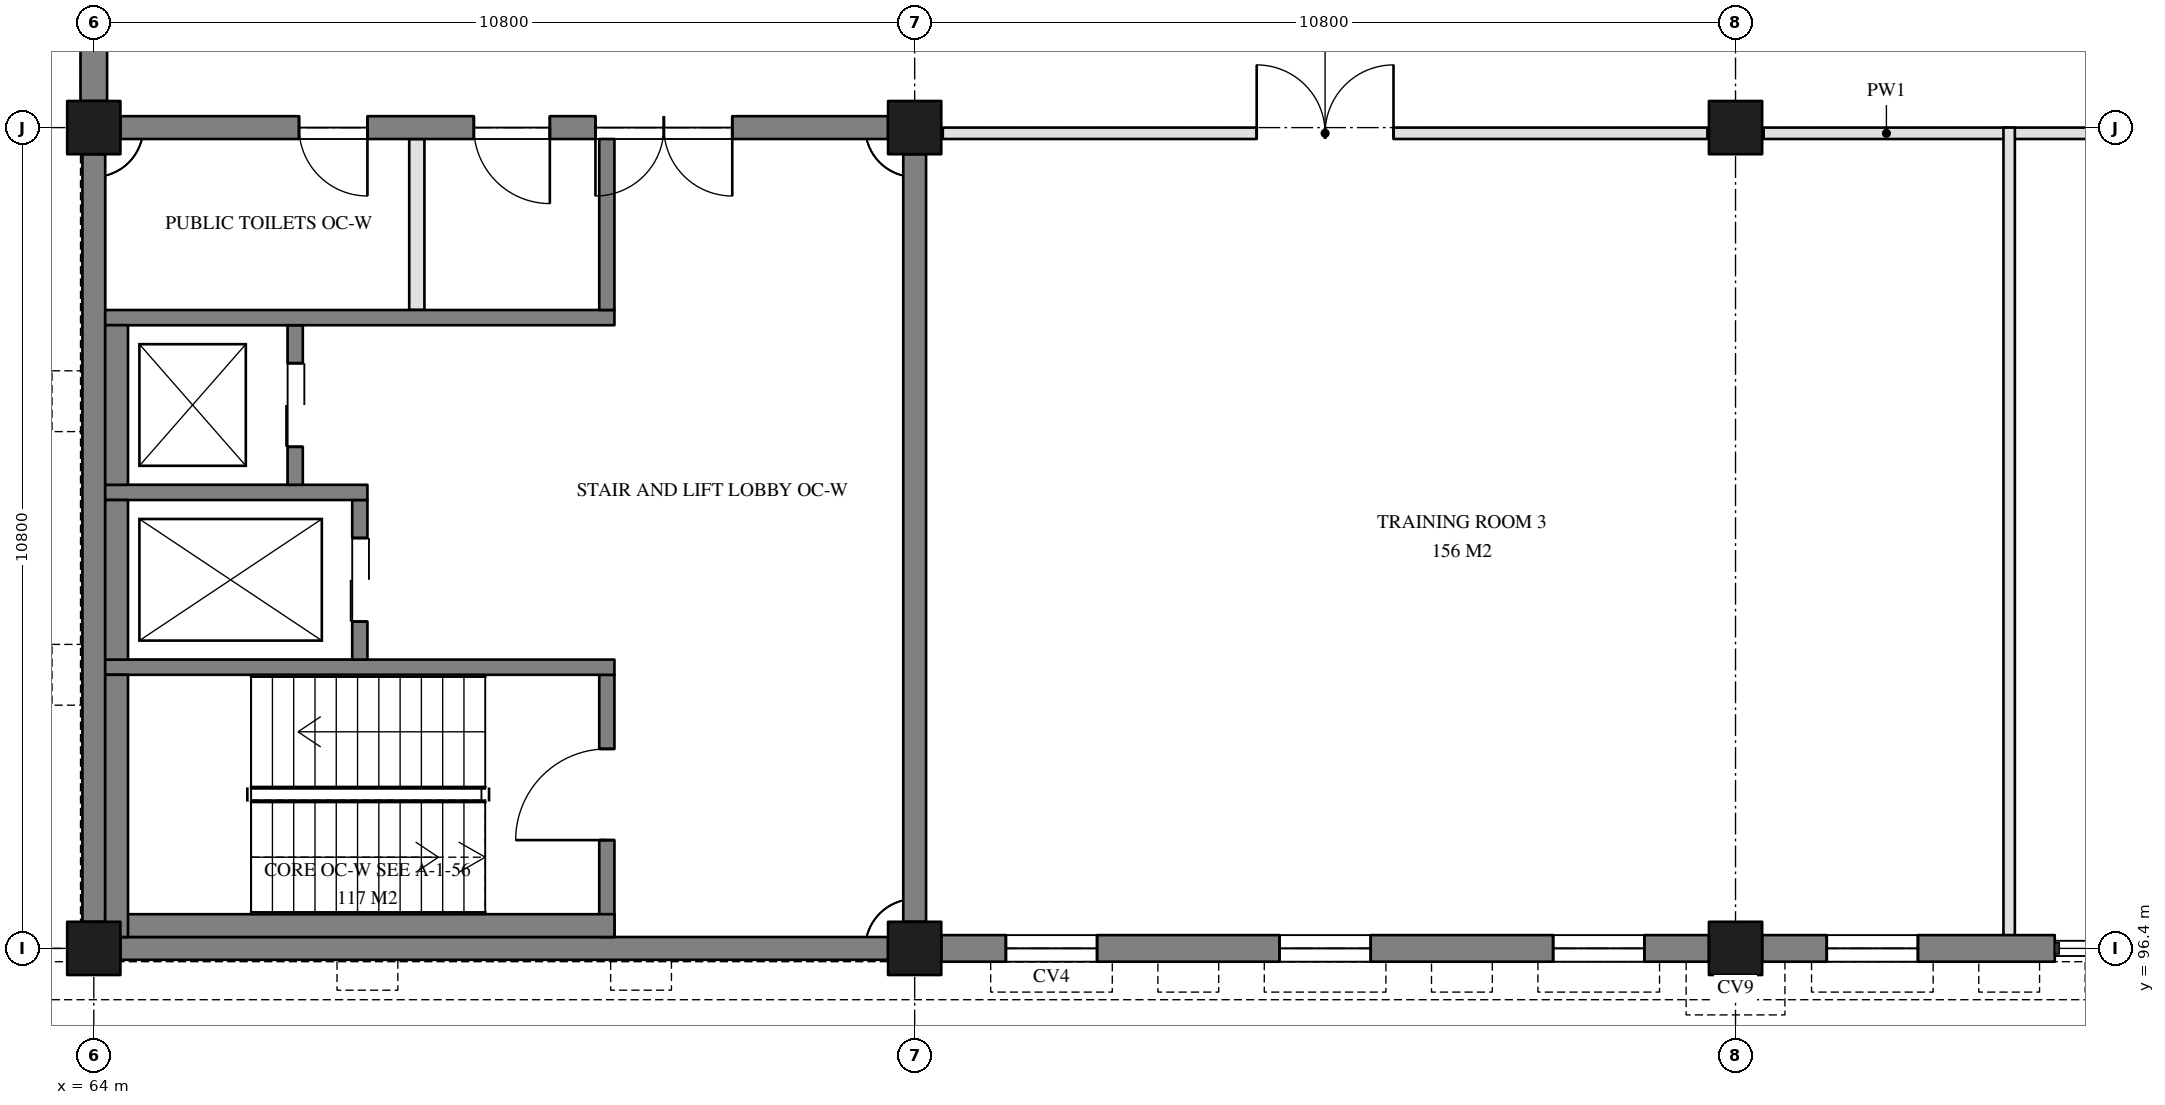
"""IFC4 building model, lengths in metres.
Left out: names, types, materials, properties, quantities, classifications, styles, units other than length and angle.
Written with IfcOpenShell. Run it as: python <this file> out.ifc"""

import sys

from ifc_helpers import new_model, si_unit, direction, frame, frame_2d, origin, origin_2d, place, context, subcontext, project, spatial, rectangle, extrude, element, fill, save


model = new_model("IFC4")
c1 = context("Model", 3, precision=1e-05, world=origin(), true_north=direction((0.0, 1.0)))
c2 = subcontext(c1, "Body", "Model", "MODEL_VIEW")
j1 = project(units=[si_unit("LENGTHUNIT", "METRE"), si_unit("PLANEANGLEUNIT", "RADIAN")], contexts=[c1])
p1 = place(None, origin())
s1 = spatial("IfcSite", under=j1, at=p1, CompositionType="ELEMENT")
p2 = place(p1, origin())
s2 = spatial("IfcBuilding", under=s1, at=p2, CompositionType="ELEMENT")
p3 = place(p2, frame((0.0, 0.0, 20.4)))
s3 = spatial("IfcBuildingStorey", under=s2, at=p3, CompositionType="ELEMENT", Elevation=20.4)
for number, where, z_axis, x_axis in (
    (1, (64.0, 96.4, 0.0), (0.0, 0.0, 1.0), (1.0, 0.0, 0.0)),
    (2, (64.0, 107.2, 0.0), (0.0, 0.0, 1.0), (1.0, 0.0, 0.0)),
    (3, (74.8, 96.4, 0.0), (0.0, 0.0, 1.0), (1.0, 0.0, 0.0)),
    (4, (74.8, 107.2, 0.0), (0.0, 0.0, 1.0), (1.0, 0.0, 0.0)),
    (5, (85.6, 96.4, 0.0), (0.0, 0.0, 1.0), (1.0, 0.0, 0.0)),
    (6, (85.6, 107.2, 0.0), (0.0, 0.0, 1.0), (1.0, 0.0, 0.0)),
):
    element("IfcColumn", number, at=place(p3, frame(where, z_axis=z_axis, x_axis=x_axis)), inside=s3, PredefinedType="COLUMN", context=c2, shape_type="SweptSolid", body=[
        extrude(rectangle(XDim=0.7, YDim=0.7, at=origin_2d()), origin(), (0.0, 0.0, 1.0), 3.9),
    ])
p4 = place(p3, frame((64.35, 96.4, 0.0), z_axis=(0.0, 0.0, 1.0), x_axis=(1.0, 0.0, 0.0)))
e7 = element("IfcWall", 7, at=p4, inside=s3, PredefinedType="SOLIDWALL", context=c2, shape_type="SweptSolid", body=[
    extrude(rectangle(XDim=10.1, YDim=0.3, at=frame_2d((5.05, 0.0))), origin(), (0.0, 0.0, 1.0), 3.9),
])
p5 = place(p3, frame((74.8, 96.75, 0.0), z_axis=(0.0, 0.0, 1.0), x_axis=(0.0, 1.0, 0.0)))
e8 = element("IfcWall", 8, at=p5, inside=s3, PredefinedType="SOLIDWALL", context=c2, shape_type="SweptSolid", body=[
    extrude(rectangle(XDim=10.1, YDim=0.3, at=frame_2d((5.05, 0.0))), origin(), (0.0, 0.0, 1.0), 3.9),
])
p6 = place(p3, frame((74.45, 107.2, 0.0), z_axis=(0.0, 0.0, 1.0), x_axis=(-1.0, 0.0, 0.0)))
e9 = element("IfcWall", 9, at=p6, inside=s3, PredefinedType="SOLIDWALL", context=c2, shape_type="SweptSolid", body=[
    extrude(rectangle(XDim=10.1, YDim=0.3, at=frame_2d((5.05, 0.0))), origin(), (0.0, 0.0, 1.0), 3.9),
])
p7 = place(p6, frame((2.05, 0.0, 0.0)))
e10 = element("IfcOpeningElement", 10, at=p7, cuts=e9, PredefinedType="OPENING", context=c2, shape_type="SweptSolid", body=[
    extrude(rectangle(XDim=1.8, YDim=2.1, at=frame_2d((0.9, 1.05))), frame((0.0, 0.16, 0.0), z_axis=(0.0, -1.0, 0.0), x_axis=(1.0, 0.0, 0.0)), (0.0, 0.0, 1.0), 0.32),
])
p8 = place(p6, frame((4.45, 0.0, 0.0)))
e11 = element("IfcOpeningElement", 11, at=p8, cuts=e9, PredefinedType="OPENING", context=c2, shape_type="SweptSolid", body=[
    extrude(rectangle(XDim=1.0, YDim=2.1, at=frame_2d((0.5, 1.05))), frame((0.0, 0.16, 0.0), z_axis=(0.0, -1.0, 0.0), x_axis=(1.0, 0.0, 0.0)), (0.0, 0.0, 1.0), 0.32),
])
p9 = place(p6, frame((6.85, 0.0, 0.0)))
e12 = element("IfcOpeningElement", 12, at=p9, cuts=e9, PredefinedType="OPENING", context=c2, shape_type="SweptSolid", body=[
    extrude(rectangle(XDim=0.9, YDim=2.1, at=frame_2d((0.45, 1.05))), frame((0.0, 0.16, 0.0), z_axis=(0.0, -1.0, 0.0), x_axis=(1.0, 0.0, 0.0)), (0.0, 0.0, 1.0), 0.32),
])
p10 = place(p3, frame((64.0, 106.85, 0.0), z_axis=(0.0, 0.0, 1.0), x_axis=(0.0, -1.0, 0.0)))
e13 = element("IfcWall", 13, at=p10, inside=s3, PredefinedType="SOLIDWALL", context=c2, shape_type="SweptSolid", body=[
    extrude(rectangle(XDim=10.1, YDim=0.3, at=frame_2d((5.05, 0.0))), origin(), (0.0, 0.0, 1.0), 3.9),
])
p11 = place(p3, frame((75.15, 96.4, 0.0), z_axis=(0.0, 0.0, 1.0), x_axis=(1.0, 0.0, 0.0)))
e14 = element("IfcWall", 14, at=p11, inside=s3, PredefinedType="SOLIDWALL", context=c2, shape_type="SweptSolid", body=[
    extrude(rectangle(XDim=10.1, YDim=0.35, at=frame_2d((5.05, 0.0))), origin(), (0.0, 0.0, 1.0), 2.8),
])
p12 = place(p11, frame((0.85, 0.0, 0.9)))
e15 = element("IfcOpeningElement", 15, at=p12, cuts=e14, PredefinedType="OPENING", context=c2, shape_type="SweptSolid", body=[
    extrude(rectangle(XDim=1.2, YDim=1.8, at=frame_2d((0.6, 0.9))), frame((0.0, 0.185, 0.0), z_axis=(0.0, -1.0, 0.0), x_axis=(1.0, 0.0, 0.0)), (0.0, 0.0, 1.0), 0.37),
])
p13 = place(p11, frame((4.45, 0.0, 0.9)))
e16 = element("IfcOpeningElement", 16, at=p13, cuts=e14, PredefinedType="OPENING", context=c2, shape_type="SweptSolid", body=[
    extrude(rectangle(XDim=1.2, YDim=1.8, at=frame_2d((0.6, 0.9))), frame((0.0, 0.185, 0.0), z_axis=(0.0, -1.0, 0.0), x_axis=(1.0, 0.0, 0.0)), (0.0, 0.0, 1.0), 0.37),
])
p14 = place(p11, frame((8.05, 0.0, 0.9)))
e17 = element("IfcOpeningElement", 17, at=p14, cuts=e14, PredefinedType="OPENING", context=c2, shape_type="SweptSolid", body=[
    extrude(rectangle(XDim=1.2, YDim=1.8, at=frame_2d((0.6, 0.9))), frame((0.0, 0.185, 0.0), z_axis=(0.0, -1.0, 0.0), x_axis=(1.0, 0.0, 0.0)), (0.0, 0.0, 1.0), 0.37),
])
p15 = place(p3, frame((85.95, 96.4, 0.0), z_axis=(0.0, 0.0, 1.0), x_axis=(1.0, 0.0, 0.0)))
e18 = element("IfcWall", 18, at=p15, inside=s3, PredefinedType="SOLIDWALL", context=c2, shape_type="SweptSolid", body=[
    extrude(rectangle(XDim=3.85, YDim=0.35, at=frame_2d((1.925, 0.0))), origin(), (0.0, 0.0, 1.0), 2.8),
])
p16 = place(p15, frame((0.85, 0.0, 0.9)))
e19 = element("IfcOpeningElement", 19, at=p16, cuts=e18, PredefinedType="OPENING", context=c2, shape_type="SweptSolid", body=[
    extrude(rectangle(XDim=1.2, YDim=1.8, at=frame_2d((0.6, 0.9))), frame((0.0, 0.185, 0.0), z_axis=(0.0, -1.0, 0.0), x_axis=(1.0, 0.0, 0.0)), (0.0, 0.0, 1.0), 0.37),
])
p17 = place(p3, frame((64.0, 107.55, 0.0), z_axis=(0.0, 0.0, 1.0), x_axis=(0.0, 1.0, 0.0)))
e20 = element("IfcWall", 20, at=p17, inside=s3, PredefinedType="SOLIDWALL", context=c2, shape_type="SweptSolid", body=[
    extrude(rectangle(XDim=3.85, YDim=0.35, at=frame_2d((1.925, 0.0))), origin(), (0.0, 0.0, 1.0), 2.8),
])
p18 = place(p17, frame((1.0, 0.0, 0.9)))
e21 = element("IfcOpeningElement", 21, at=p18, cuts=e20, PredefinedType="OPENING", context=c2, shape_type="SweptSolid", body=[
    extrude(rectangle(XDim=0.9, YDim=1.8, at=frame_2d((0.45, 0.9))), frame((0.0, 0.185, 0.0), z_axis=(0.0, -1.0, 0.0), x_axis=(1.0, 0.0, 0.0)), (0.0, 0.0, 1.0), 0.37),
])
p19 = place(p3, frame((70.75, 96.55, 0.0), z_axis=(0.0, 0.0, 1.0), x_axis=(0.0, 1.0, 0.0)))
e22 = element("IfcWall", 22, at=p19, inside=s3, PredefinedType="SOLIDWALL", context=c2, shape_type="SweptSolid", body=[
    extrude(rectangle(XDim=3.45, YDim=0.2, at=frame_2d((1.725, 0.0))), origin(), (0.0, 0.0, 1.0), 3.6),
])
p20 = place(p19, frame((1.275, 0.0, 0.0)))
e23 = element("IfcOpeningElement", 23, at=p20, cuts=e22, PredefinedType="OPENING", context=c2, shape_type="SweptSolid", body=[
    extrude(rectangle(XDim=1.2, YDim=2.1, at=frame_2d((0.6, 1.05))), frame((0.0, 0.11, 0.0), z_axis=(0.0, -1.0, 0.0), x_axis=(1.0, 0.0, 0.0)), (0.0, 0.0, 1.0), 0.22),
])
p21 = place(p3, frame((70.85, 100.1, 0.0), z_axis=(0.0, 0.0, 1.0), x_axis=(-1.0, 0.0, 0.0)))
e24 = element("IfcWall", 24, at=p21, inside=s3, PredefinedType="SOLIDWALL", context=c2, shape_type="SweptSolid", body=[
    extrude(rectangle(XDim=6.7, YDim=0.2, at=frame_2d((3.35, 0.0))), origin(), (0.0, 0.0, 1.0), 3.6),
])
p22 = place(p3, frame((67.5, 100.2, 0.0), z_axis=(0.0, 0.0, 1.0), x_axis=(0.0, 1.0, 0.0)))
e25 = element("IfcWall", 25, at=p22, inside=s3, PredefinedType="SOLIDWALL", context=c2, shape_type="SweptSolid", body=[
    extrude(rectangle(XDim=2.1, YDim=0.2, at=frame_2d((1.05, 0.0))), origin(), (0.0, 0.0, 1.0), 3.6),
])
p23 = place(p22, frame((0.5, 0.0, 0.0)))
e26 = element("IfcOpeningElement", 26, at=p23, cuts=e25, PredefinedType="OPENING", context=c2, shape_type="SweptSolid", body=[
    extrude(rectangle(XDim=1.1, YDim=2.1, at=frame_2d((0.55, 1.05))), frame((0.0, 0.11, 0.0), z_axis=(0.0, -1.0, 0.0), x_axis=(1.0, 0.0, 0.0)), (0.0, 0.0, 1.0), 0.22),
])
p24 = place(p3, frame((67.6, 102.4, 0.0), z_axis=(0.0, 0.0, 1.0), x_axis=(-1.0, 0.0, 0.0)))
e27 = element("IfcWall", 27, at=p24, inside=s3, PredefinedType="SOLIDWALL", context=c2, shape_type="SweptSolid", body=[
    extrude(rectangle(XDim=3.45, YDim=0.2, at=frame_2d((1.725, 0.0))), origin(), (0.0, 0.0, 1.0), 3.6),
])
p25 = place(p3, frame((66.65, 102.5, 0.0), z_axis=(0.0, 0.0, 1.0), x_axis=(0.0, 1.0, 0.0)))
e28 = element("IfcWall", 28, at=p25, inside=s3, PredefinedType="SOLIDWALL", context=c2, shape_type="SweptSolid", body=[
    extrude(rectangle(XDim=2.1, YDim=0.2, at=frame_2d((1.05, 0.0))), origin(), (0.0, 0.0, 1.0), 3.6),
])
p26 = place(p25, frame((0.5, 0.0, 0.0)))
e29 = element("IfcOpeningElement", 29, at=p26, cuts=e28, PredefinedType="OPENING", context=c2, shape_type="SweptSolid", body=[
    extrude(rectangle(XDim=1.1, YDim=2.1, at=frame_2d((0.55, 1.05))), frame((0.0, 0.11, 0.0), z_axis=(0.0, -1.0, 0.0), x_axis=(1.0, 0.0, 0.0)), (0.0, 0.0, 1.0), 0.22),
])
p27 = place(p3, frame((70.85, 104.7, 0.0), z_axis=(0.0, 0.0, 1.0), x_axis=(-1.0, 0.0, 0.0)))
e30 = element("IfcWall", 30, at=p27, inside=s3, PredefinedType="SOLIDWALL", context=c2, shape_type="SweptSolid", body=[
    extrude(rectangle(XDim=6.7, YDim=0.2, at=frame_2d((3.35, 0.0))), origin(), (0.0, 0.0, 1.0), 3.6),
])
p28 = place(p3, frame((70.75, 104.8, 0.0), z_axis=(0.0, 0.0, 1.0), x_axis=(0.0, 1.0, 0.0)))
e31 = element("IfcWall", 31, at=p28, inside=s3, PredefinedType="SOLIDWALL", context=c2, shape_type="SweptSolid", body=[
    extrude(rectangle(XDim=2.25, YDim=0.2, at=frame_2d((1.125, 0.0))), origin(), (0.0, 0.0, 1.0), 3.6),
])
p29 = place(p3, frame((70.85, 96.7, -0.3), z_axis=(0.0, 0.0, 1.0), x_axis=(-1.0, 0.0, 0.0)))
e32 = element("IfcWall", 32, at=p29, inside=s3, PredefinedType="SOLIDWALL", context=c2, shape_type="SweptSolid", body=[
    extrude(rectangle(XDim=6.7, YDim=0.3, at=frame_2d((3.35, 0.0))), origin(), (0.0, 0.0, 1.0), 3.9),
])
p30 = place(p3, frame((64.3, 96.55, -0.3), z_axis=(0.0, 0.0, 1.0), x_axis=(0.0, 1.0, 0.0)))
e33 = element("IfcWall", 33, at=p30, inside=s3, PredefinedType="SOLIDWALL", context=c2, shape_type="SweptSolid", body=[
    extrude(rectangle(XDim=3.45, YDim=0.3, at=frame_2d((1.725, 0.0))), origin(), (0.0, 0.0, 1.0), 3.9),
])
for number, where, z_axis, x_axis in (
    (34, (64.3, 100.2, -0.3), (0.0, 0.0, 1.0), (0.0, 1.0, 0.0)),
    (35, (64.3, 102.5, -0.3), (0.0, 0.0, 1.0), (0.0, 1.0, 0.0)),
):
    element("IfcWall", number, at=place(p3, frame(where, z_axis=z_axis, x_axis=x_axis)), inside=s3, PredefinedType="SOLIDWALL", context=c2, shape_type="SweptSolid", body=[
        extrude(rectangle(XDim=2.1, YDim=0.3, at=frame_2d((1.05, 0.0))), origin(), (0.0, 0.0, 1.0), 3.9),
    ])
p31 = place(p3, frame((68.25, 104.8, 0.0), z_axis=(0.0, 0.0, 1.0), x_axis=(0.0, 1.0, 0.0)))
e36 = element("IfcWall", 36, at=p31, inside=s3, PredefinedType="PARTITIONING", context=c2, shape_type="SweptSolid", body=[
    extrude(rectangle(XDim=2.25, YDim=0.2, at=frame_2d((1.125, 0.0))), origin(), (0.0, 0.0, 1.0), 3.6),
])
p32 = place(p3, frame((85.97, 107.125, 0.0), z_axis=(0.0, 0.0, 1.0), x_axis=(1.0, 0.0, 0.0)))
e37 = element("IfcWall", 37, at=p32, inside=s3, PredefinedType="PARTITIONING", context=c2, shape_type="SweptSolid", body=[
    extrude(rectangle(XDim=3.23, YDim=0.15, at=frame_2d((1.615, 0.0))), origin(), (0.0, 0.0, 1.0), 2.8),
])
p33 = place(p3, frame((75.17, 107.125, 0.0), z_axis=(0.0, 0.0, 1.0), x_axis=(1.0, 0.0, 0.0)))
e38 = element("IfcWall", 38, at=p33, inside=s3, PredefinedType="PARTITIONING", context=c2, shape_type="SweptSolid", body=[
    extrude(rectangle(XDim=10.06, YDim=0.15, at=frame_2d((5.03, 0.0))), origin(), (0.0, 0.0, 1.0), 2.8),
])
p34 = place(p33, frame((4.13, 0.0, 0.0)))
e39 = element("IfcOpeningElement", 39, at=p34, cuts=e38, PredefinedType="OPENING", context=c2, shape_type="SweptSolid", body=[
    extrude(rectangle(XDim=1.8, YDim=2.1, at=frame_2d((0.9, 1.05))), frame((0.0, 0.085, 0.0), z_axis=(0.0, -1.0, 0.0), x_axis=(1.0, 0.0, 0.0)), (0.0, 0.0, 1.0), 0.17),
])
p35 = place(p3, frame((89.2, 107.125, 0.0), z_axis=(0.0, 0.0, 1.0), x_axis=(1.0, 0.0, 0.0)))
e40 = element("IfcWall", 40, at=p35, inside=s3, PredefinedType="PARTITIONING", context=c2, shape_type="SweptSolid", body=[
    extrude(rectangle(XDim=6.83, YDim=0.15, at=frame_2d((3.415, 0.0))), origin(), (0.0, 0.0, 1.0), 2.8),
])
p36 = place(p3, frame((89.2, 96.4, 0.0), z_axis=(0.0, 0.0, 1.0), x_axis=(0.0, 1.0, 0.0)))
e41 = element("IfcWall", 41, at=p36, inside=s3, PredefinedType="PARTITIONING", context=c2, shape_type="SweptSolid", body=[
    extrude(rectangle(XDim=10.8, YDim=0.15, at=frame_2d((5.4, 0.0))), origin(), (0.0, 0.0, 1.0), 2.8),
])
p37 = place(p12, origin())
e42 = element("IfcWindow", 42, at=p37, inside=s3, PartitioningType="SINGLE_PANEL", PredefinedType="WINDOW", context=c2, shape_type="SweptSolid", body=[
    extrude(rectangle(XDim=1.2, YDim=1.8, at=frame_2d((0.6, 0.9))), frame((0.0, 0.03, 0.0), z_axis=(0.0, -1.0, 0.0), x_axis=(1.0, 0.0, 0.0)), (0.0, 0.0, 1.0), 0.06),
])
fill(e15, e42)
p38 = place(p13, origin())
e43 = element("IfcWindow", 43, at=p38, inside=s3, PartitioningType="SINGLE_PANEL", PredefinedType="WINDOW", context=c2, shape_type="SweptSolid", body=[
    extrude(rectangle(XDim=1.2, YDim=1.8, at=frame_2d((0.6, 0.9))), frame((0.0, 0.03, 0.0), z_axis=(0.0, -1.0, 0.0), x_axis=(1.0, 0.0, 0.0)), (0.0, 0.0, 1.0), 0.06),
])
fill(e16, e43)
p39 = place(p14, origin())
e44 = element("IfcWindow", 44, at=p39, inside=s3, PartitioningType="SINGLE_PANEL", PredefinedType="WINDOW", context=c2, shape_type="SweptSolid", body=[
    extrude(rectangle(XDim=1.2, YDim=1.8, at=frame_2d((0.6, 0.9))), frame((0.0, 0.03, 0.0), z_axis=(0.0, -1.0, 0.0), x_axis=(1.0, 0.0, 0.0)), (0.0, 0.0, 1.0), 0.06),
])
fill(e17, e44)
p40 = place(p16, origin())
e45 = element("IfcWindow", 45, at=p40, inside=s3, PartitioningType="SINGLE_PANEL", PredefinedType="WINDOW", context=c2, shape_type="SweptSolid", body=[
    extrude(rectangle(XDim=1.2, YDim=1.8, at=frame_2d((0.6, 0.9))), frame((0.0, 0.03, 0.0), z_axis=(0.0, -1.0, 0.0), x_axis=(1.0, 0.0, 0.0)), (0.0, 0.0, 1.0), 0.06),
])
fill(e19, e45)
p41 = place(p23, frame((1.1, 0.0, 0.0), z_axis=(0.0, 0.0, 1.0), x_axis=(-1.0, 0.0, 0.0)))
e46 = element("IfcDoor", 46, at=p41, inside=s3, OperationType="DOUBLE_DOOR_SLIDING", PredefinedType="DOOR", context=c2, shape_type="SweptSolid", body=[
    extrude(rectangle(XDim=1.1, YDim=2.1, at=frame_2d((0.55, 1.05))), frame((0.0, 0.025, 0.0), z_axis=(0.0, -1.0, 0.0), x_axis=(1.0, 0.0, 0.0)), (0.0, 0.0, 1.0), 0.05),
])
fill(e26, e46)
p42 = place(p26, frame((1.1, 0.0, 0.0), z_axis=(0.0, 0.0, 1.0), x_axis=(-1.0, 0.0, 0.0)))
e47 = element("IfcDoor", 47, at=p42, inside=s3, OperationType="DOUBLE_DOOR_SLIDING", PredefinedType="DOOR", context=c2, shape_type="SweptSolid", body=[
    extrude(rectangle(XDim=1.1, YDim=2.1, at=frame_2d((0.55, 1.05))), frame((0.0, 0.025, 0.0), z_axis=(0.0, -1.0, 0.0), x_axis=(1.0, 0.0, 0.0)), (0.0, 0.0, 1.0), 0.05),
])
fill(e29, e47)
p43 = place(p20, frame((1.2, 0.0, 0.0), z_axis=(0.0, 0.0, 1.0), x_axis=(-1.0, 0.0, 0.0)))
e48 = element("IfcDoor", 48, at=p43, inside=s3, OperationType="SINGLE_SWING_LEFT", PredefinedType="DOOR", context=c2, shape_type="SweptSolid", body=[
    extrude(rectangle(XDim=1.2, YDim=2.1, at=frame_2d((0.6, 1.05))), frame((0.0, 0.025, 0.0), z_axis=(0.0, -1.0, 0.0), x_axis=(1.0, 0.0, 0.0)), (0.0, 0.0, 1.0), 0.05),
])
fill(e23, e48)
p44 = place(p7, frame((1.8, 0.0, 0.0), z_axis=(0.0, 0.0, 1.0), x_axis=(-1.0, 0.0, 0.0)))
e49 = element("IfcDoor", 49, at=p44, inside=s3, OperationType="DOUBLE_DOOR_DOUBLE_SWING", PredefinedType="DOOR", context=c2, shape_type="SweptSolid", body=[
    extrude(rectangle(XDim=1.8, YDim=2.1, at=frame_2d((0.9, 1.05))), frame((0.0, 0.025, 0.0), z_axis=(0.0, -1.0, 0.0), x_axis=(1.0, 0.0, 0.0)), (0.0, 0.0, 1.0), 0.05),
])
fill(e10, e49)
p45 = place(p8, origin())
e50 = element("IfcDoor", 50, at=p45, inside=s3, OperationType="SINGLE_SWING_LEFT", PredefinedType="DOOR", context=c2, shape_type="SweptSolid", body=[
    extrude(rectangle(XDim=1.0, YDim=2.1, at=frame_2d((0.5, 1.05))), frame((0.0, 0.025, 0.0), z_axis=(0.0, -1.0, 0.0), x_axis=(1.0, 0.0, 0.0)), (0.0, 0.0, 1.0), 0.05),
])
fill(e11, e50)
p46 = place(p9, origin())
e51 = element("IfcDoor", 51, at=p46, inside=s3, OperationType="SINGLE_SWING_RIGHT", PredefinedType="DOOR", context=c2, shape_type="SweptSolid", body=[
    extrude(rectangle(XDim=0.9, YDim=2.1, at=frame_2d((0.45, 1.05))), frame((0.0, 0.025, 0.0), z_axis=(0.0, -1.0, 0.0), x_axis=(1.0, 0.0, 0.0)), (0.0, 0.0, 1.0), 0.05),
])
fill(e12, e51)
p47 = place(p34, origin())
e52 = element("IfcDoor", 52, at=p47, inside=s3, OperationType="DOUBLE_DOOR_DOUBLE_SWING", PredefinedType="DOOR", context=c2, shape_type="SweptSolid", body=[
    extrude(rectangle(XDim=1.8, YDim=2.1, at=frame_2d((0.9, 1.05))), frame((0.0, 0.025, 0.0), z_axis=(0.0, -1.0, 0.0), x_axis=(1.0, 0.0, 0.0)), (0.0, 0.0, 1.0), 0.05),
])
fill(e39, e52)
save(model, sys.argv[1])
